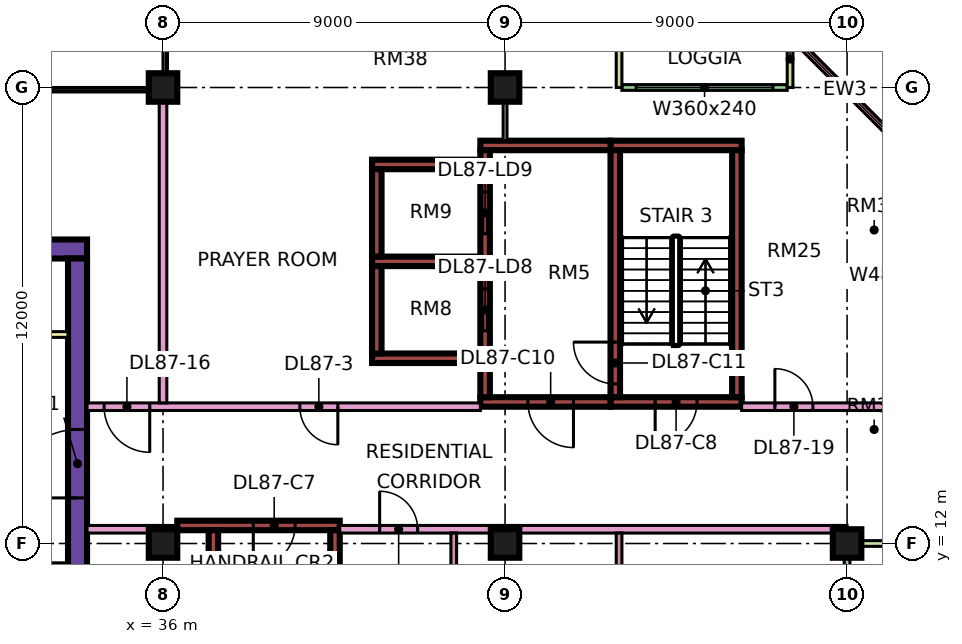
"""IFC4 building model, lengths in metres.
Left out: names, types, materials, properties, quantities, classifications, styles, units other than length and angle.
Written with IfcOpenShell. Run it as: python <this file> out.ifc"""

import sys

from ifc_helpers import new_model, si_unit, direction, frame, frame_2d, origin, origin_2d, place, context, subcontext, project, spatial, rectangle, extrude, element, fill, save


model = new_model("IFC4")
c1 = context("Model", 3, precision=1e-05, world=origin(), true_north=direction((0.0, 1.0)))
c2 = subcontext(c1, "Body", "Model", "MODEL_VIEW")
j1 = project(units=[si_unit("LENGTHUNIT", "METRE"), si_unit("PLANEANGLEUNIT", "RADIAN")], contexts=[c1])
p1 = place(None, origin())
s1 = spatial("IfcSite", under=j1, at=p1, CompositionType="ELEMENT")
p2 = place(p1, origin())
s2 = spatial("IfcBuilding", under=s1, at=p2, CompositionType="ELEMENT")
p3 = place(p2, frame((0.0, 0.0, 372.65)))
s3 = spatial("IfcBuildingStorey", under=s2, at=p3, CompositionType="ELEMENT", Elevation=372.65)
for number, where, z_axis, x_axis in (
    (1, (36.0, 12.0, 0.0), (0.0, 0.0, 1.0), (1.0, 0.0, 0.0)),
    (2, (36.0, 24.0, 0.0), (0.0, 0.0, 1.0), (1.0, 0.0, 0.0)),
    (3, (45.0, 12.0, 0.0), (0.0, 0.0, 1.0), (1.0, 0.0, 0.0)),
    (4, (45.0, 24.0, 0.0), (0.0, 0.0, 1.0), (1.0, 0.0, 0.0)),
    (5, (54.0, 12.0, 0.0), (0.0, 0.0, 1.0), (1.0, 0.0, 0.0)),
):
    element("IfcColumn", number, at=place(p3, frame(where, z_axis=z_axis, x_axis=x_axis)), inside=s3, PredefinedType="COLUMN", context=c2, shape_type="SweptSolid", body=[
        extrude(rectangle(XDim=0.75, YDim=0.75, at=origin_2d()), origin(), (0.0, 0.0, 1.0), 3.75),
    ])
p4 = place(p3, frame((9.0, 19.75, 0.0), z_axis=(0.0, 0.0, 1.0), x_axis=(1.0, 0.0, 0.0)))
e6 = element("IfcWall", 6, at=p4, inside=s3, PredefinedType="SHEAR", context=c2, shape_type="SweptSolid", body=[
    extrude(rectangle(XDim=25.0, YDim=0.5, at=frame_2d((12.5, 0.0))), origin(), (0.0, 0.0, 1.0), 3.75),
])
p5 = place(p4, frame((19.1, 0.0, 0.0)))
e7 = element("IfcOpeningElement", 7, at=p5, cuts=e6, PredefinedType="OPENING", context=c2, shape_type="SweptSolid", body=[
    extrude(rectangle(XDim=1.8, YDim=2.4, at=frame_2d((0.9, 1.2))), frame((0.0, 0.26, 0.0), z_axis=(0.0, -1.0, 0.0), x_axis=(1.0, 0.0, 0.0)), (0.0, 0.0, 1.0), 0.52),
])
p6 = place(p3, frame((33.75, 7.5, 0.0), z_axis=(0.0, 0.0, 1.0), x_axis=(0.0, 1.0, 0.0)))
e8 = element("IfcWall", 8, at=p6, inside=s3, PredefinedType="SHEAR", context=c2, shape_type="SweptSolid", body=[
    extrude(rectangle(XDim=12.0, YDim=0.5, at=frame_2d((6.0, 0.0))), origin(), (0.0, 0.0, 1.0), 3.75),
])
p7 = place(p6, frame((5.7, 0.0, 0.0)))
e9 = element("IfcOpeningElement", 9, at=p7, cuts=e8, PredefinedType="OPENING", context=c2, shape_type="SweptSolid", body=[
    extrude(rectangle(XDim=1.8, YDim=2.4, at=frame_2d((0.9, 1.2))), frame((0.0, 0.26, 0.0), z_axis=(0.0, -1.0, 0.0), x_axis=(1.0, 0.0, 0.0)), (0.0, 0.0, 1.0), 0.52),
])
p8 = place(p3, frame((36.375, 12.475, 0.0), z_axis=(0.0, 0.0, 1.0), x_axis=(1.0, 0.0, 0.0)))
e10 = element("IfcWall", 10, at=p8, inside=s3, PredefinedType="SHEAR", context=c2, shape_type="SweptSolid", body=[
    extrude(rectangle(XDim=4.275, YDim=0.25, at=frame_2d((2.137, 0.0))), origin(), (0.0, 0.0, 1.0), 3.75),
])
p9 = place(p8, frame((2.0, 0.0, 0.0)))
e11 = element("IfcOpeningElement", 11, at=p9, cuts=e10, PredefinedType="OPENING", context=c2, shape_type="SweptSolid", body=[
    extrude(rectangle(XDim=1.1, YDim=2.2, at=frame_2d((0.55, 1.1))), frame((0.0, 0.135, 0.0), z_axis=(0.0, -1.0, 0.0), x_axis=(1.0, 0.0, 0.0)), (0.0, 0.0, 1.0), 0.27),
])
for number, where, z_axis, x_axis in (
    (12, (37.325, 5.85, 0.0), (0.0, 0.0, 1.0), (0.0, 1.0, 0.0)),
    (13, (40.525, 5.85, 0.0), (0.0, 0.0, 1.0), (0.0, 1.0, 0.0)),
):
    element("IfcWall", number, at=place(p3, frame(where, z_axis=z_axis, x_axis=x_axis)), inside=s3, PredefinedType="SHEAR", context=c2, shape_type="SweptSolid", body=[
        extrude(rectangle(XDim=6.5, YDim=0.25, at=frame_2d((3.25, 0.0))), origin(), (0.0, 0.0, 1.0), 3.75),
    ])
p10 = place(p3, frame((47.775, 15.725, 0.0), z_axis=(0.0, 0.0, 1.0), x_axis=(1.0, 0.0, 0.0)))
e14 = element("IfcWall", 14, at=p10, inside=s3, PredefinedType="SHEAR", context=c2, shape_type="SweptSolid", body=[
    extrude(rectangle(XDim=3.45, YDim=0.25, at=frame_2d((1.725, 0.0))), origin(), (0.0, 0.0, 1.0), 3.75),
])
p11 = place(p10, frame((1.175, 0.0, 0.0)))
e15 = element("IfcOpeningElement", 15, at=p11, cuts=e14, PredefinedType="OPENING", context=c2, shape_type="SweptSolid", body=[
    extrude(rectangle(XDim=1.1, YDim=2.2, at=frame_2d((0.55, 1.1))), frame((0.0, 0.135, 0.0), z_axis=(0.0, -1.0, 0.0), x_axis=(1.0, 0.0, 0.0)), (0.0, 0.0, 1.0), 0.27),
])
p12 = place(p3, frame((47.775, 22.475, 0.0), z_axis=(0.0, 0.0, 1.0), x_axis=(1.0, 0.0, 0.0)))
e16 = element("IfcWall", 16, at=p12, inside=s3, PredefinedType="SHEAR", context=c2, shape_type="SweptSolid", body=[
    extrude(rectangle(XDim=3.45, YDim=0.25, at=frame_2d((1.725, 0.0))), origin(), (0.0, 0.0, 1.0), 3.75),
])
p13 = place(p3, frame((47.9, 15.85, 0.0), z_axis=(0.0, 0.0, 1.0), x_axis=(0.0, 1.0, 0.0)))
e17 = element("IfcWall", 17, at=p13, inside=s3, PredefinedType="SHEAR", context=c2, shape_type="SweptSolid", body=[
    extrude(rectangle(XDim=6.5, YDim=0.25, at=frame_2d((3.25, 0.0))), origin(), (0.0, 0.0, 1.0), 3.75),
])
p14 = place(p13, frame((0.35, 0.0, 0.0)))
e18 = element("IfcOpeningElement", 18, at=p14, cuts=e17, PredefinedType="OPENING", context=c2, shape_type="SweptSolid", body=[
    extrude(rectangle(XDim=1.1, YDim=2.2, at=frame_2d((0.55, 1.1))), frame((0.0, 0.135, 0.0), z_axis=(0.0, -1.0, 0.0), x_axis=(1.0, 0.0, 0.0)), (0.0, 0.0, 1.0), 0.27),
])
p15 = place(p3, frame((51.1, 15.85, 0.0), z_axis=(0.0, 0.0, 1.0), x_axis=(0.0, 1.0, 0.0)))
e19 = element("IfcWall", 19, at=p15, inside=s3, PredefinedType="SHEAR", context=c2, shape_type="SweptSolid", body=[
    extrude(rectangle(XDim=6.5, YDim=0.25, at=frame_2d((3.25, 0.0))), origin(), (0.0, 0.0, 1.0), 3.75),
])
p16 = place(p3, frame((44.35, 15.725, 0.0), z_axis=(0.0, 0.0, 1.0), x_axis=(1.0, 0.0, 0.0)))
e20 = element("IfcWall", 20, at=p16, inside=s3, PredefinedType="SHEAR", context=c2, shape_type="SweptSolid", body=[
    extrude(rectangle(XDim=3.425, YDim=0.25, at=frame_2d((1.712, 0.0))), origin(), (0.0, 0.0, 1.0), 3.75),
])
p17 = place(p16, frame((1.25, 0.0, 0.0)))
e21 = element("IfcOpeningElement", 21, at=p17, cuts=e20, PredefinedType="OPENING", context=c2, shape_type="SweptSolid", body=[
    extrude(rectangle(XDim=1.2, YDim=2.2, at=frame_2d((0.6, 1.1))), frame((0.0, 0.135, 0.0), z_axis=(0.0, -1.0, 0.0), x_axis=(1.0, 0.0, 0.0)), (0.0, 0.0, 1.0), 0.27),
])
p18 = place(p3, frame((44.35, 22.475, 0.0), z_axis=(0.0, 0.0, 1.0), x_axis=(1.0, 0.0, 0.0)))
e22 = element("IfcWall", 22, at=p18, inside=s3, PredefinedType="SHEAR", context=c2, shape_type="SweptSolid", body=[
    extrude(rectangle(XDim=3.425, YDim=0.25, at=frame_2d((1.712, 0.0))), origin(), (0.0, 0.0, 1.0), 3.75),
])
p19 = place(p3, frame((44.475, 15.85, 0.0), z_axis=(0.0, 0.0, 1.0), x_axis=(0.0, 1.0, 0.0)))
e23 = element("IfcWall", 23, at=p19, inside=s3, PredefinedType="SHEAR", context=c2, shape_type="SweptSolid", body=[
    extrude(rectangle(XDim=6.5, YDim=0.25, at=frame_2d((3.25, 0.0))), origin(), (0.0, 0.0, 1.0), 3.75),
])
p20 = place(p19, frame((1.75, 0.0, 0.0)))
e24 = element("IfcOpeningElement", 24, at=p20, cuts=e23, PredefinedType="OPENING", context=c2, shape_type="SweptSolid", body=[
    extrude(rectangle(XDim=1.1, YDim=2.2, at=frame_2d((0.55, 1.1))), frame((0.0, 0.135, 0.0), z_axis=(0.0, -1.0, 0.0), x_axis=(1.0, 0.0, 0.0)), (0.0, 0.0, 1.0), 0.27),
])
p21 = place(p19, frame((4.3, 0.0, 0.0)))
e25 = element("IfcOpeningElement", 25, at=p21, cuts=e23, PredefinedType="OPENING", context=c2, shape_type="SweptSolid", body=[
    extrude(rectangle(XDim=1.1, YDim=2.2, at=frame_2d((0.55, 1.1))), frame((0.0, 0.135, 0.0), z_axis=(0.0, -1.0, 0.0), x_axis=(1.0, 0.0, 0.0)), (0.0, 0.0, 1.0), 0.27),
])
for number, where, z_axis, x_axis in (
    (26, (41.5, 16.875, 0.0), (0.0, 0.0, 1.0), (1.0, 0.0, 0.0)),
    (27, (41.5, 19.425, 0.0), (0.0, 0.0, 1.0), (1.0, 0.0, 0.0)),
    (28, (41.5, 21.975, 0.0), (0.0, 0.0, 1.0), (1.0, 0.0, 0.0)),
):
    element("IfcWall", number, at=place(p3, frame(where, z_axis=z_axis, x_axis=x_axis)), inside=s3, PredefinedType="SHEAR", context=c2, shape_type="SweptSolid", body=[
        extrude(rectangle(XDim=2.85, YDim=0.25, at=frame_2d((1.425, 0.0))), origin(), (0.0, 0.0, 1.0), 3.75),
    ])
for number, where, z_axis, x_axis in (
    (29, (41.625, 17.0, 0.0), (0.0, 0.0, 1.0), (0.0, 1.0, 0.0)),
    (30, (41.625, 19.55, 0.0), (0.0, 0.0, 1.0), (0.0, 1.0, 0.0)),
):
    element("IfcWall", number, at=place(p3, frame(where, z_axis=z_axis, x_axis=x_axis)), inside=s3, PredefinedType="SHEAR", context=c2, shape_type="SweptSolid", body=[
        extrude(rectangle(XDim=2.3, YDim=0.25, at=frame_2d((1.15, 0.0))), origin(), (0.0, 0.0, 1.0), 3.75),
    ])
p22 = place(p3, frame((52.425, 24.0, 0.0), z_axis=(0.0, 0.0, 1.0), x_axis=(-1.0, 0.0, 0.0)))
e31 = element("IfcWall", 31, at=p22, inside=s3, PredefinedType="SOLIDWALL", context=c2, shape_type="SweptSolid", body=[
    extrude(rectangle(XDim=4.35, YDim=0.15, at=frame_2d((2.175, 0.0))), origin(), (0.0, 0.0, 1.0), 3.35),
])
p23 = place(p22, frame((0.375, 0.0, 0.45)))
e32 = element("IfcOpeningElement", 32, at=p23, cuts=e31, PredefinedType="OPENING", context=c2, shape_type="SweptSolid", body=[
    extrude(rectangle(XDim=3.6, YDim=2.4, at=frame_2d((1.8, 1.2))), frame((0.0, 0.085, 0.0), z_axis=(0.0, -1.0, 0.0), x_axis=(1.0, 0.0, 0.0)), (0.0, 0.0, 1.0), 0.17),
])
for number, where, z_axis, x_axis in (
    (33, (52.5, 25.5, 0.0), (0.0, 0.0, 1.0), (0.0, -1.0, 0.0)),
    (34, (48.0, 25.5, 0.0), (0.0, 0.0, 1.0), (0.0, -1.0, 0.0)),
):
    element("IfcWall", number, at=place(p3, frame(where, z_axis=z_axis, x_axis=x_axis)), inside=s3, PredefinedType="SOLIDWALL", context=c2, shape_type="SweptSolid", body=[
        extrude(rectangle(XDim=1.5, YDim=0.15, at=frame_2d((0.75, 0.0))), origin(), (0.0, 0.0, 1.0), 3.35),
    ])
p24 = place(p3, frame((54.0, 1.575, 0.0), z_axis=(0.0, 0.0, 1.0), x_axis=(0.0, 1.0, 0.0)))
e35 = element("IfcWall", 35, at=p24, inside=s3, PredefinedType="SOLIDWALL", context=c2, shape_type="SweptSolid", body=[
    extrude(rectangle(XDim=10.35, YDim=0.15, at=frame_2d((5.175, 0.0))), origin(), (0.0, 0.0, 1.0), 3.35),
])
p25 = place(p24, frame((0.663, 0.0, 0.0)))
e36 = element("IfcOpeningElement", 36, at=p25, cuts=e35, PredefinedType="OPENING", context=c2, shape_type="SweptSolid", body=[
    extrude(rectangle(XDim=1.8, YDim=2.4, at=frame_2d((0.9, 1.2))), frame((0.0, 0.085, 0.0), z_axis=(0.0, -1.0, 0.0), x_axis=(1.0, 0.0, 0.0)), (0.0, 0.0, 1.0), 0.17),
])
p26 = place(p24, frame((5.637, 0.0, 0.45)))
e37 = element("IfcOpeningElement", 37, at=p26, cuts=e35, PredefinedType="OPENING", context=c2, shape_type="SweptSolid", body=[
    extrude(rectangle(XDim=3.0, YDim=2.4, at=frame_2d((1.5, 1.2))), frame((0.0, 0.085, 0.0), z_axis=(0.0, -1.0, 0.0), x_axis=(1.0, 0.0, 0.0)), (0.0, 0.0, 1.0), 0.17),
])
p27 = place(p3, frame((55.5, 12.0, 0.0), z_axis=(0.0, 0.0, 1.0), x_axis=(-1.0, 0.0, 0.0)))
e38 = element("IfcWall", 38, at=p27, inside=s3, PredefinedType="SOLIDWALL", context=c2, shape_type="SweptSolid", body=[
    extrude(rectangle(XDim=1.5, YDim=0.15, at=frame_2d((0.75, 0.0))), origin(), (0.0, 0.0, 1.0), 3.35),
])
p28 = place(p3, frame((55.447, 22.447, 0.0), z_axis=(0.0, 0.0, 1.0), x_axis=(-0.707106781187, 0.707106781187, 0.0)))
e39 = element("IfcWall", 39, at=p28, inside=s3, PredefinedType="SOLIDWALL", context=c2, shape_type="SweptSolid", body=[
    extrude(rectangle(XDim=4.243, YDim=0.15, at=frame_2d((2.121, 0.0))), origin(), (0.0, 0.0, 1.0), 3.35),
])
p29 = place(p28, frame((0.621, 0.0, 0.45)))
e40 = element("IfcOpeningElement", 40, at=p29, cuts=e39, PredefinedType="OPENING", context=c2, shape_type="SweptSolid", body=[
    extrude(rectangle(XDim=3.0, YDim=2.4, at=frame_2d((1.5, 1.2))), frame((0.0, 0.085, 0.0), z_axis=(0.0, -1.0, 0.0), x_axis=(1.0, 0.0, 0.0)), (0.0, 0.0, 1.0), 0.17),
])
p30 = place(p3, frame((30.2, 17.5, 0.0), z_axis=(0.0, 0.0, 1.0), x_axis=(1.0, 0.0, 0.0)))
e41 = element("IfcWall", 41, at=p30, inside=s3, PredefinedType="PARTITIONING", context=c2, shape_type="SweptSolid", body=[
    extrude(rectangle(XDim=3.3, YDim=0.15, at=frame_2d((1.65, 0.0))), origin(), (0.0, 0.0, 1.0), 3.35),
])
p31 = place(p3, frame((34.0, 12.375, 0.0), z_axis=(0.0, 0.0, 1.0), x_axis=(1.0, 0.0, 0.0)))
e42 = element("IfcWall", 42, at=p31, inside=s3, PredefinedType="PARTITIONING", context=c2, shape_type="SweptSolid", body=[
    extrude(rectangle(XDim=2.376, YDim=0.2, at=frame_2d((1.188, 0.0))), origin(), (0.0, 0.0, 1.0), 3.35),
])
p32 = place(p3, frame((34.0, 15.6, 0.0), z_axis=(0.0, 0.0, 1.0), x_axis=(1.0, 0.0, 0.0)))
e43 = element("IfcWall", 43, at=p32, inside=s3, PredefinedType="PARTITIONING", context=c2, shape_type="SweptSolid", body=[
    extrude(rectangle(XDim=10.35, YDim=0.2, at=frame_2d((5.175, 0.0))), origin(), (0.0, 0.0, 1.0), 3.35),
])
p33 = place(p32, frame((5.6, 0.0, 0.0)))
e44 = element("IfcOpeningElement", 44, at=p33, cuts=e43, PredefinedType="OPENING", context=c2, shape_type="SweptSolid", body=[
    extrude(rectangle(XDim=1.0, YDim=2.1, at=frame_2d((0.5, 1.05))), frame((0.0, 0.11, 0.0), z_axis=(0.0, -1.0, 0.0), x_axis=(1.0, 0.0, 0.0)), (0.0, 0.0, 1.0), 0.22),
])
p34 = place(p32, frame((0.45, 0.0, 0.0)))
e45 = element("IfcOpeningElement", 45, at=p34, cuts=e43, PredefinedType="OPENING", context=c2, shape_type="SweptSolid", body=[
    extrude(rectangle(XDim=1.2, YDim=2.1, at=frame_2d((0.6, 1.05))), frame((0.0, 0.11, 0.0), z_axis=(0.0, -1.0, 0.0), x_axis=(1.0, 0.0, 0.0)), (0.0, 0.0, 1.0), 0.22),
])
p35 = place(p3, frame((36.0, 15.7, 0.0), z_axis=(0.0, 0.0, 1.0), x_axis=(0.0, 1.0, 0.0)))
e46 = element("IfcWall", 46, at=p35, inside=s3, PredefinedType="PARTITIONING", context=c2, shape_type="SweptSolid", body=[
    extrude(rectangle(XDim=8.3, YDim=0.2, at=frame_2d((4.15, 0.0))), origin(), (0.0, 0.0, 1.0), 3.35),
])
p36 = place(p3, frame((40.65, 12.375, 0.0), z_axis=(0.0, 0.0, 1.0), x_axis=(1.0, 0.0, 0.0)))
e47 = element("IfcWall", 47, at=p36, inside=s3, PredefinedType="PARTITIONING", context=c2, shape_type="SweptSolid", body=[
    extrude(rectangle(XDim=13.35, YDim=0.2, at=frame_2d((6.675, 0.0))), origin(), (0.0, 0.0, 1.0), 3.35),
])
p37 = place(p36, frame((1.05, 0.0, 0.0)))
e48 = element("IfcOpeningElement", 48, at=p37, cuts=e47, PredefinedType="OPENING", context=c2, shape_type="SweptSolid", body=[
    extrude(rectangle(XDim=1.0, YDim=2.1, at=frame_2d((0.5, 1.05))), frame((0.0, 0.11, 0.0), z_axis=(0.0, -1.0, 0.0), x_axis=(1.0, 0.0, 0.0)), (0.0, 0.0, 1.0), 0.22),
])
p38 = place(p3, frame((43.65, 5.975, 0.0), z_axis=(0.0, 0.0, 1.0), x_axis=(0.0, 1.0, 0.0)))
e49 = element("IfcWall", 49, at=p38, inside=s3, PredefinedType="PARTITIONING", context=c2, shape_type="SweptSolid", body=[
    extrude(rectangle(XDim=6.3, YDim=0.15, at=frame_2d((3.15, 0.0))), origin(), (0.0, 0.0, 1.0), 3.35),
])
p39 = place(p38, frame((4.275, 0.0, 0.0)))
e50 = element("IfcOpeningElement", 50, at=p39, cuts=e49, PredefinedType="OPENING", context=c2, shape_type="SweptSolid", body=[
    extrude(rectangle(XDim=0.9, YDim=2.1, at=frame_2d((0.45, 1.05))), frame((0.0, 0.085, 0.0), z_axis=(0.0, -1.0, 0.0), x_axis=(1.0, 0.0, 0.0)), (0.0, 0.0, 1.0), 0.17),
])
p40 = place(p3, frame((45.0, 22.6, 0.0), z_axis=(0.0, 0.0, 1.0), x_axis=(0.0, 1.0, 0.0)))
e51 = element("IfcWall", 51, at=p40, inside=s3, PredefinedType="PARTITIONING", context=c2, shape_type="SweptSolid", body=[
    extrude(rectangle(XDim=1.4, YDim=0.1, at=frame_2d((0.7, 0.0))), origin(), (0.0, 0.0, 1.0), 3.35),
])
p41 = place(p3, frame((48.0, 5.975, 0.0), z_axis=(0.0, 0.0, 1.0), x_axis=(0.0, 1.0, 0.0)))
e52 = element("IfcWall", 52, at=p41, inside=s3, PredefinedType="PARTITIONING", context=c2, shape_type="SweptSolid", body=[
    extrude(rectangle(XDim=6.3, YDim=0.15, at=frame_2d((3.15, 0.0))), origin(), (0.0, 0.0, 1.0), 3.35),
])
p42 = place(p3, frame((51.225, 15.6, 0.0), z_axis=(0.0, 0.0, 1.0), x_axis=(1.0, 0.0, 0.0)))
e53 = element("IfcWall", 53, at=p42, inside=s3, PredefinedType="PARTITIONING", context=c2, shape_type="SweptSolid", body=[
    extrude(rectangle(XDim=4.125, YDim=0.2, at=frame_2d((2.062, 0.0))), origin(), (0.0, 0.0, 1.0), 3.35),
])
p43 = place(p42, frame((0.875, 0.0, 0.0)))
e54 = element("IfcOpeningElement", 54, at=p43, cuts=e53, PredefinedType="OPENING", context=c2, shape_type="SweptSolid", body=[
    extrude(rectangle(XDim=1.0, YDim=2.1, at=frame_2d((0.5, 1.05))), frame((0.0, 0.11, 0.0), z_axis=(0.0, -1.0, 0.0), x_axis=(1.0, 0.0, 0.0)), (0.0, 0.0, 1.0), 0.22),
])
p44 = place(p23, origin())
e55 = element("IfcWindow", 55, at=p44, inside=s3, PartitioningType="SINGLE_PANEL", PredefinedType="WINDOW", context=c2, shape_type="SweptSolid", body=[
    extrude(rectangle(XDim=3.6, YDim=2.4, at=frame_2d((1.8, 1.2))), frame((0.0, 0.03, 0.0), z_axis=(0.0, -1.0, 0.0), x_axis=(1.0, 0.0, 0.0)), (0.0, 0.0, 1.0), 0.06),
])
fill(e32, e55)
p45 = place(p29, origin())
e56 = element("IfcWindow", 56, at=p45, inside=s3, PartitioningType="SINGLE_PANEL", PredefinedType="WINDOW", context=c2, shape_type="SweptSolid", body=[
    extrude(rectangle(XDim=3.0, YDim=2.4, at=frame_2d((1.5, 1.2))), frame((0.0, 0.03, 0.0), z_axis=(0.0, -1.0, 0.0), x_axis=(1.0, 0.0, 0.0)), (0.0, 0.0, 1.0), 0.06),
])
fill(e40, e56)
p46 = place(p7, origin())
e57 = element("IfcDoor", 57, at=p46, inside=s3, OperationType="DOUBLE_DOOR_SINGLE_SWING", PredefinedType="DOOR", context=c2, shape_type="SweptSolid", body=[
    extrude(rectangle(XDim=1.8, YDim=2.4, at=frame_2d((0.9, 1.2))), frame((0.0, 0.025, 0.0), z_axis=(0.0, -1.0, 0.0), x_axis=(1.0, 0.0, 0.0)), (0.0, 0.0, 1.0), 0.05),
])
fill(e9, e57)
p47 = place(p9, frame((1.1, 0.0, 0.0), z_axis=(0.0, 0.0, 1.0), x_axis=(-1.0, 0.0, 0.0)))
e58 = element("IfcDoor", 58, at=p47, inside=s3, OperationType="SINGLE_SWING_LEFT", PredefinedType="DOOR", context=c2, shape_type="SweptSolid", body=[
    extrude(rectangle(XDim=1.1, YDim=2.2, at=frame_2d((0.55, 1.1))), frame((0.0, 0.025, 0.0), z_axis=(0.0, -1.0, 0.0), x_axis=(1.0, 0.0, 0.0)), (0.0, 0.0, 1.0), 0.05),
])
fill(e11, e58)
p48 = place(p11, frame((1.1, 0.0, 0.0), z_axis=(0.0, 0.0, 1.0), x_axis=(-1.0, 0.0, 0.0)))
e59 = element("IfcDoor", 59, at=p48, inside=s3, OperationType="SINGLE_SWING_LEFT", PredefinedType="DOOR", context=c2, shape_type="SweptSolid", body=[
    extrude(rectangle(XDim=1.1, YDim=2.2, at=frame_2d((0.55, 1.1))), frame((0.0, 0.025, 0.0), z_axis=(0.0, -1.0, 0.0), x_axis=(1.0, 0.0, 0.0)), (0.0, 0.0, 1.0), 0.05),
])
fill(e15, e59)
p49 = place(p17, origin())
e60 = element("IfcDoor", 60, at=p49, inside=s3, OperationType="SINGLE_SWING_RIGHT", PredefinedType="DOOR", context=c2, shape_type="SweptSolid", body=[
    extrude(rectangle(XDim=1.2, YDim=2.2, at=frame_2d((0.6, 1.1))), frame((0.0, 0.025, 0.0), z_axis=(0.0, -1.0, 0.0), x_axis=(1.0, 0.0, 0.0)), (0.0, 0.0, 1.0), 0.05),
])
fill(e21, e60)
p50 = place(p14, frame((1.1, 0.0, 0.0), z_axis=(0.0, 0.0, 1.0), x_axis=(-1.0, 0.0, 0.0)))
e61 = element("IfcDoor", 61, at=p50, inside=s3, OperationType="SINGLE_SWING_RIGHT", PredefinedType="DOOR", context=c2, shape_type="SweptSolid", body=[
    extrude(rectangle(XDim=1.1, YDim=2.2, at=frame_2d((0.55, 1.1))), frame((0.0, 0.025, 0.0), z_axis=(0.0, -1.0, 0.0), x_axis=(1.0, 0.0, 0.0)), (0.0, 0.0, 1.0), 0.05),
])
fill(e18, e61)
p51 = place(p20, origin())
e62 = element("IfcDoor", 62, at=p51, inside=s3, OperationType="DOUBLE_DOOR_SLIDING", PredefinedType="DOOR", context=c2, shape_type="SweptSolid", body=[
    extrude(rectangle(XDim=1.1, YDim=2.2, at=frame_2d((0.55, 1.1))), frame((0.0, 0.025, 0.0), z_axis=(0.0, -1.0, 0.0), x_axis=(1.0, 0.0, 0.0)), (0.0, 0.0, 1.0), 0.05),
])
fill(e24, e62)
p52 = place(p21, origin())
e63 = element("IfcDoor", 63, at=p52, inside=s3, OperationType="DOUBLE_DOOR_SLIDING", PredefinedType="DOOR", context=c2, shape_type="SweptSolid", body=[
    extrude(rectangle(XDim=1.1, YDim=2.2, at=frame_2d((0.55, 1.1))), frame((0.0, 0.025, 0.0), z_axis=(0.0, -1.0, 0.0), x_axis=(1.0, 0.0, 0.0)), (0.0, 0.0, 1.0), 0.05),
])
fill(e25, e63)
p53 = place(p33, origin())
e64 = element("IfcDoor", 64, at=p53, inside=s3, OperationType="SINGLE_SWING_RIGHT", PredefinedType="DOOR", context=c2, shape_type="SweptSolid", body=[
    extrude(rectangle(XDim=1.0, YDim=2.1, at=frame_2d((0.5, 1.05))), frame((0.0, 0.025, 0.0), z_axis=(0.0, -1.0, 0.0), x_axis=(1.0, 0.0, 0.0)), (0.0, 0.0, 1.0), 0.05),
])
fill(e44, e64)
p54 = place(p34, origin())
e65 = element("IfcDoor", 65, at=p54, inside=s3, OperationType="SINGLE_SWING_RIGHT", PredefinedType="DOOR", context=c2, shape_type="SweptSolid", body=[
    extrude(rectangle(XDim=1.2, YDim=2.1, at=frame_2d((0.6, 1.05))), frame((0.0, 0.025, 0.0), z_axis=(0.0, -1.0, 0.0), x_axis=(1.0, 0.0, 0.0)), (0.0, 0.0, 1.0), 0.05),
])
fill(e45, e65)
p55 = place(p43, origin())
e66 = element("IfcDoor", 66, at=p55, inside=s3, OperationType="SINGLE_SWING_LEFT", PredefinedType="DOOR", context=c2, shape_type="SweptSolid", body=[
    extrude(rectangle(XDim=1.0, YDim=2.1, at=frame_2d((0.5, 1.05))), frame((0.0, 0.025, 0.0), z_axis=(0.0, -1.0, 0.0), x_axis=(1.0, 0.0, 0.0)), (0.0, 0.0, 1.0), 0.05),
])
fill(e54, e66)
p56 = place(p37, origin())
e67 = element("IfcDoor", 67, at=p56, inside=s3, OperationType="SINGLE_SWING_LEFT", PredefinedType="DOOR", context=c2, shape_type="SweptSolid", body=[
    extrude(rectangle(XDim=1.0, YDim=2.1, at=frame_2d((0.5, 1.05))), frame((0.0, 0.025, 0.0), z_axis=(0.0, -1.0, 0.0), x_axis=(1.0, 0.0, 0.0)), (0.0, 0.0, 1.0), 0.05),
])
fill(e48, e67)
save(model, sys.argv[1])
